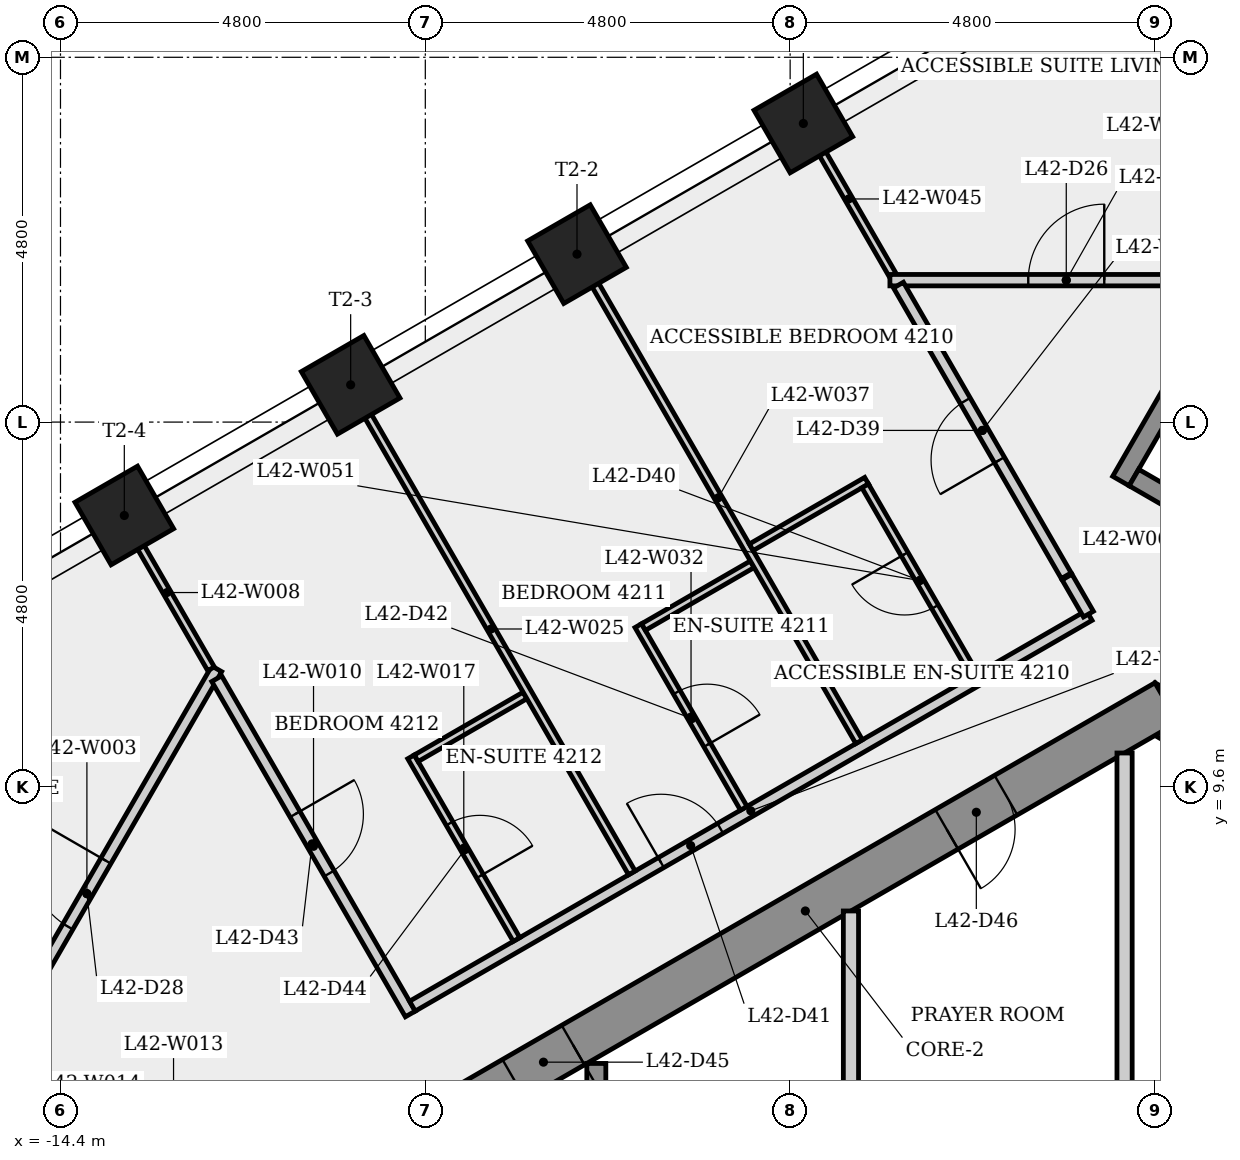
"""IFC4 building model, lengths in metres.
Left out: names, types, materials, properties, quantities, classifications, styles, units other than length and angle.
Written with IfcOpenShell. Run it as: python <this file> out.ifc"""

import sys

from ifc_helpers import new_model, si_unit, direction, frame, frame_2d, origin, origin_2d, place, context, subcontext, project, spatial, rectangle, extrude, element, fill, save


model = new_model("IFC4")
c1 = context("Model", 3, precision=1e-05, world=origin(), true_north=direction((0.0, 1.0)))
c2 = subcontext(c1, "Body", "Model", "MODEL_VIEW")
j1 = project(units=[si_unit("LENGTHUNIT", "METRE"), si_unit("PLANEANGLEUNIT", "RADIAN")], contexts=[c1])
p1 = place(None, origin())
s1 = spatial("IfcSite", under=j1, at=p1, CompositionType="ELEMENT")
p2 = place(p1, origin())
s2 = spatial("IfcBuilding", under=s1, at=p2, CompositionType="ELEMENT")
p3 = place(p2, frame((0.0, 0.0, 159.5)))
s3 = spatial("IfcBuildingStorey", under=s2, at=p3, CompositionType="ELEMENT", Elevation=159.5)
p4 = place(p3, frame((9.35, 5.225, 0.0), z_axis=(0.0, 0.0, 1.0), x_axis=(-0.866023993627, 0.500002442456, 0.0)))
e1 = element("IfcWall", 1, at=p4, inside=s3, PredefinedType="SHEAR", context=c2, shape_type="SweptSolid", body=[
    extrude(rectangle(XDim=10.97, YDim=0.6, at=frame_2d((5.485, 0.0))), origin(), (0.0, 0.0, 1.0), 3.4),
])
p5 = place(p4, frame((8.325, 0.0, 0.0)))
e2 = element("IfcOpeningElement", 2, at=p5, cuts=e1, PredefinedType="OPENING", context=c2, shape_type="SweptSolid", body=[
    extrude(rectangle(XDim=0.9, YDim=2.1, at=frame_2d((0.45, 1.05))), frame((0.0, 0.31, 0.0), z_axis=(0.0, -1.0, 0.0), x_axis=(1.0, 0.0, 0.0)), (0.0, 0.0, 1.0), 0.62),
])
p6 = place(p4, frame((1.518, 0.0, 0.0)))
e3 = element("IfcOpeningElement", 3, at=p6, cuts=e1, PredefinedType="OPENING", context=c2, shape_type="SweptSolid", body=[
    extrude(rectangle(XDim=0.9, YDim=2.1, at=frame_2d((0.45, 1.05))), frame((0.0, 0.31, 0.0), z_axis=(0.0, -1.0, 0.0), x_axis=(1.0, 0.0, 0.0)), (0.0, 0.0, 1.0), 0.62),
])
p7 = place(p3, frame((0.15, 10.71, 0.0), z_axis=(0.0, 0.0, 1.0), x_axis=(-0.866023993627, -0.500002442456, 0.0)))
e4 = element("IfcWall", 4, at=p7, inside=s3, PredefinedType="SHEAR", context=c2, shape_type="SweptSolid", body=[
    extrude(rectangle(XDim=10.97, YDim=0.6, at=frame_2d((5.485, 0.0))), origin(), (0.0, 0.0, 1.0), 3.4),
])
p8 = place(p7, frame((9.013, 0.0, 0.0)))
e5 = element("IfcOpeningElement", 5, at=p8, cuts=e4, PredefinedType="OPENING", context=c2, shape_type="SweptSolid", body=[
    extrude(rectangle(XDim=0.9, YDim=2.1, at=frame_2d((0.45, 1.05))), frame((0.0, 0.31, 0.0), z_axis=(0.0, -1.0, 0.0), x_axis=(1.0, 0.0, 0.0)), (0.0, 0.0, 1.0), 0.62),
])
p9 = place(p7, frame((2.437, 0.0, 0.0)))
e6 = element("IfcOpeningElement", 6, at=p9, cuts=e4, PredefinedType="OPENING", context=c2, shape_type="SweptSolid", body=[
    extrude(rectangle(XDim=0.9, YDim=2.1, at=frame_2d((0.45, 1.05))), frame((0.0, 0.31, 0.0), z_axis=(0.0, -1.0, 0.0), x_axis=(1.0, 0.0, 0.0)), (0.0, 0.0, 1.0), 0.62),
])
for number, where, z_axis, x_axis in (
    (7, (-4.626, 18.329, 0.0), (0.0, 0.0, 1.0), (-0.5, 0.866, 0.0)),
    (8, (-7.604, 16.61, 0.0), (0.0, 0.0, 1.0), (-0.5, 0.866, 0.0)),
    (9, (-10.582, 14.89, 0.0), (0.0, 0.0, 1.0), (-0.5, 0.866, 0.0)),
    (10, (-13.56, 13.171, 0.0), (0.0, 0.0, 1.0), (-0.5, 0.866, 0.0)),
):
    element("IfcColumn", number, at=place(p3, frame(where, z_axis=z_axis, x_axis=x_axis)), inside=s3, PredefinedType="COLUMN", context=c2, shape_type="SweptSolid", body=[
        extrude(rectangle(XDim=0.95, YDim=0.95, at=origin_2d()), origin(), (0.0, 0.0, 1.0), 3.4),
    ])
p10 = place(p3, frame((-15.76, 5.237, 0.0), z_axis=(0.0, 0.0, 1.0), x_axis=(0.500009081712, 0.866020160392, 0.0)))
e11 = element("IfcWall", 11, at=p10, inside=s3, PredefinedType="PARTITIONING", context=c2, shape_type="SweptSolid", body=[
    extrude(rectangle(XDim=6.832, YDim=0.15, at=frame_2d((3.416, 0.0))), origin(), (0.0, 0.0, 1.0), 3.05),
])
p11 = place(p10, frame((2.916, 0.0, 0.0)))
e12 = element("IfcOpeningElement", 12, at=p11, cuts=e11, PredefinedType="OPENING", context=c2, shape_type="SweptSolid", body=[
    extrude(rectangle(XDim=1.0, YDim=2.1, at=frame_2d((0.5, 1.05))), frame((0.0, 0.085, 0.0), z_axis=(0.0, -1.0, 0.0), x_axis=(1.0, 0.0, 0.0)), (0.0, 0.0, 1.0), 0.17),
])
p12 = place(p3, frame((-13.578, 13.161, 0.0), z_axis=(0.0, 0.0, 1.0), x_axis=(0.500014285048, -0.866017156151, 0.0)))
e13 = element("IfcWall", 13, at=p12, inside=s3, PredefinedType="PARTITIONING", context=c2, shape_type="SweptSolid", body=[
    extrude(rectangle(XDim=2.317, YDim=0.1, at=frame_2d((1.159, 0.0))), origin(), (0.0, 0.0, 1.0), 3.05),
])
p13 = place(p3, frame((-12.344, 11.024, 0.0), z_axis=(0.0, 0.0, 1.0), x_axis=(0.50001008724, -0.866019579835, 0.0)))
e14 = element("IfcWall", 14, at=p13, inside=s3, PredefinedType="PARTITIONING", context=c2, shape_type="SweptSolid", body=[
    extrude(rectangle(XDim=5.094, YDim=0.15, at=frame_2d((2.547, 0.0))), origin(), (0.0, 0.0, 1.0), 3.05),
])
p14 = place(p13, frame((2.06, 0.0, 0.0)))
e15 = element("IfcOpeningElement", 15, at=p14, cuts=e14, PredefinedType="OPENING", context=c2, shape_type="SweptSolid", body=[
    extrude(rectangle(XDim=0.9, YDim=2.1, at=frame_2d((0.45, 1.05))), frame((0.0, 0.085, 0.0), z_axis=(0.0, -1.0, 0.0), x_axis=(1.0, 0.0, 0.0)), (0.0, 0.0, 1.0), 0.17),
])
p15 = place(p3, frame((-9.77, 6.715, 0.0), z_axis=(0.0, 0.0, 1.0), x_axis=(0.866022281964, 0.500005407112, 0.0)))
e16 = element("IfcWall", 16, at=p15, inside=s3, PredefinedType="PARTITIONING", context=c2, shape_type="SweptSolid", body=[
    extrude(rectangle(XDim=10.282, YDim=0.15, at=frame_2d((5.141, 0.0))), origin(), (0.0, 0.0, 1.0), 3.05),
])
p16 = place(p15, frame((3.777, 0.0, 0.0)))
e17 = element("IfcOpeningElement", 17, at=p16, cuts=e16, PredefinedType="OPENING", context=c2, shape_type="SweptSolid", body=[
    extrude(rectangle(XDim=0.9, YDim=2.1, at=frame_2d((0.45, 1.05))), frame((0.0, 0.085, 0.0), z_axis=(0.0, -1.0, 0.0), x_axis=(1.0, 0.0, 0.0)), (0.0, 0.0, 1.0), 0.17),
])
p17 = place(p3, frame((-9.788, 9.995, 0.0), z_axis=(0.0, 0.0, 1.0), x_axis=(0.50007530636, -0.865981921271, 0.0)))
e18 = element("IfcWall", 18, at=p17, inside=s3, PredefinedType="PARTITIONING", context=c2, shape_type="SweptSolid", body=[
    extrude(rectangle(XDim=2.775, YDim=0.1, at=frame_2d((1.387, 0.0))), origin(), (0.0, 0.0, 1.0), 3.05),
])
p18 = place(p17, frame((1.012, 0.0, 0.0)))
e19 = element("IfcOpeningElement", 19, at=p18, cuts=e18, PredefinedType="OPENING", context=c2, shape_type="SweptSolid", body=[
    extrude(rectangle(XDim=0.8, YDim=2.1, at=frame_2d((0.4, 1.05))), frame((0.0, 0.06, 0.0), z_axis=(0.0, -1.0, 0.0), x_axis=(1.0, 0.0, 0.0)), (0.0, 0.0, 1.0), 0.12),
])
p19 = place(p3, frame((-8.288, 10.803, 0.0), z_axis=(0.0, 0.0, 1.0), x_axis=(-0.866052736899, -0.499952654668, 0.0)))
e20 = element("IfcWall", 20, at=p19, inside=s3, PredefinedType="PARTITIONING", context=c2, shape_type="SweptSolid", body=[
    extrude(rectangle(XDim=1.653, YDim=0.1, at=frame_2d((0.826, 0.0))), origin(), (0.0, 0.0, 1.0), 3.05),
])
p20 = place(p3, frame((-10.588, 14.887, 0.0), z_axis=(0.0, 0.0, 1.0), x_axis=(0.499997136009, -0.866027057304, 0.0)))
e21 = element("IfcWall", 21, at=p20, inside=s3, PredefinedType="PARTITIONING", context=c2, shape_type="SweptSolid", body=[
    extrude(rectangle(XDim=7.412, YDim=0.1, at=frame_2d((3.706, 0.0))), origin(), (0.0, 0.0, 1.0), 3.05),
])
p21 = place(p3, frame((-7.35, 1.925, 0.0), z_axis=(0.0, 0.0, 1.0), x_axis=(0.0, 1.0, 0.0)))
e22 = element("IfcWall", 22, at=p21, inside=s3, PredefinedType="SHEAR", context=c2, shape_type="SweptSolid", body=[
    extrude(rectangle(XDim=4.036, YDim=0.25, at=frame_2d((2.018, 0.0))), origin(), (0.0, 0.0, 1.0), 3.05),
])
p22 = place(p3, frame((-6.798, 11.722, 0.0), z_axis=(0.0, 0.0, 1.0), x_axis=(0.499971228071, -0.866042014628, 0.0)))
e23 = element("IfcWall", 23, at=p22, inside=s3, PredefinedType="PARTITIONING", context=c2, shape_type="SweptSolid", body=[
    extrude(rectangle(XDim=2.775, YDim=0.1, at=frame_2d((1.388, 0.0))), origin(), (0.0, 0.0, 1.0), 3.05),
])
p23 = place(p22, frame((1.012, 0.0, 0.0)))
e24 = element("IfcOpeningElement", 24, at=p23, cuts=e23, PredefinedType="OPENING", context=c2, shape_type="SweptSolid", body=[
    extrude(rectangle(XDim=0.8, YDim=2.1, at=frame_2d((0.4, 1.05))), frame((0.0, 0.06, 0.0), z_axis=(0.0, -1.0, 0.0), x_axis=(1.0, 0.0, 0.0)), (0.0, 0.0, 1.0), 0.12),
])
p24 = place(p3, frame((-5.298, 12.529, 0.0), z_axis=(0.0, 0.0, 1.0), x_axis=(-0.866116703855, -0.499841830287, 0.0)))
e25 = element("IfcWall", 25, at=p24, inside=s3, PredefinedType="PARTITIONING", context=c2, shape_type="SweptSolid", body=[
    extrude(rectangle(XDim=1.652, YDim=0.1, at=frame_2d((0.826, 0.0))), origin(), (0.0, 0.0, 1.0), 3.05),
])
p25 = place(p3, frame((-7.598, 16.613, 0.0), z_axis=(0.0, 0.0, 1.0), x_axis=(0.500011399757, -0.866018822032, 0.0)))
e26 = element("IfcWall", 26, at=p25, inside=s3, PredefinedType="PARTITIONING", context=c2, shape_type="SweptSolid", body=[
    extrude(rectangle(XDim=7.411, YDim=0.1, at=frame_2d((3.706, 0.0))), origin(), (0.0, 0.0, 1.0), 3.05),
])
p26 = place(p3, frame((-4.0, 7.967, 0.0), z_axis=(0.0, 0.0, 1.0), x_axis=(0.0, -1.0, 0.0)))
e27 = element("IfcWall", 27, at=p26, inside=s3, PredefinedType="PARTITIONING", context=c2, shape_type="SweptSolid", body=[
    extrude(rectangle(XDim=2.692, YDim=0.2, at=frame_2d((1.346, 0.0))), origin(), (0.0, 0.0, 1.0), 3.05),
])
p27 = place(p3, frame((-3.794, 13.629, 0.0), z_axis=(0.0, 0.0, 1.0), x_axis=(-0.866013897511, -0.50001992892, 0.0)))
e28 = element("IfcWall", 28, at=p27, inside=s3, PredefinedType="PARTITIONING", context=c2, shape_type="SweptSolid", body=[
    extrude(rectangle(XDim=1.752, YDim=0.1, at=frame_2d((0.876, 0.0))), origin(), (0.0, 0.0, 1.0), 3.05),
])
p28 = place(p3, frame((-3.45, 16.332, 0.0), z_axis=(0.0, 0.0, 1.0), x_axis=(-0.499968667644, 0.866043492773, 0.0)))
e29 = element("IfcWall", 29, at=p28, inside=s3, PredefinedType="PARTITIONING", context=c2, shape_type="SweptSolid", body=[
    extrude(rectangle(XDim=2.318, YDim=0.1, at=frame_2d((1.159, 0.0))), origin(), (0.0, 0.0, 1.0), 3.05),
])
p29 = place(p3, frame((-3.487, 16.267, 0.0), z_axis=(0.0, 0.0, 1.0), x_axis=(1.0, 0.0, 0.0)))
e30 = element("IfcWall", 30, at=p29, inside=s3, PredefinedType="PARTITIONING", context=c2, shape_type="SweptSolid", body=[
    extrude(rectangle(XDim=4.64, YDim=0.15, at=frame_2d((2.32, 0.0))), origin(), (0.0, 0.0, 1.0), 3.05),
])
p30 = place(p29, frame((1.82, 0.0, 0.0)))
e31 = element("IfcOpeningElement", 31, at=p30, cuts=e30, PredefinedType="OPENING", context=c2, shape_type="SweptSolid", body=[
    extrude(rectangle(XDim=1.0, YDim=2.1, at=frame_2d((0.5, 1.05))), frame((0.0, 0.085, 0.0), z_axis=(0.0, -1.0, 0.0), x_axis=(1.0, 0.0, 0.0)), (0.0, 0.0, 1.0), 0.17),
])
p31 = place(p3, frame((-2.375, 11.071, 0.0), z_axis=(0.0, 0.0, 1.0), x_axis=(-0.500011588718, 0.866018712932, 0.0)))
e32 = element("IfcWall", 32, at=p31, inside=s3, PredefinedType="PARTITIONING", context=c2, shape_type="SweptSolid", body=[
    extrude(rectangle(XDim=2.875, YDim=0.1, at=frame_2d((1.438, 0.0))), origin(), (0.0, 0.0, 1.0), 3.05),
])
p32 = place(p31, frame((1.038, 0.0, 0.0)))
e33 = element("IfcOpeningElement", 33, at=p32, cuts=e32, PredefinedType="OPENING", context=c2, shape_type="SweptSolid", body=[
    extrude(rectangle(XDim=0.8, YDim=2.1, at=frame_2d((0.4, 1.05))), frame((0.0, 0.06, 0.0), z_axis=(0.0, -1.0, 0.0), x_axis=(1.0, 0.0, 0.0)), (0.0, 0.0, 1.0), 0.12),
])
p33 = place(p3, frame((-1.167, 12.378, 0.0), z_axis=(0.0, 0.0, 1.0), x_axis=(-0.499998454624, 0.866026296006, 0.0)))
e34 = element("IfcWall", 34, at=p33, inside=s3, PredefinedType="PARTITIONING", context=c2, shape_type="SweptSolid", body=[
    extrude(rectangle(XDim=4.416, YDim=0.15, at=frame_2d((2.208, 0.0))), origin(), (0.0, 0.0, 1.0), 3.05),
])
p34 = place(p33, frame((1.758, 0.0, 0.0)))
e35 = element("IfcOpeningElement", 35, at=p34, cuts=e34, PredefinedType="OPENING", context=c2, shape_type="SweptSolid", body=[
    extrude(rectangle(XDim=0.9, YDim=2.1, at=frame_2d((0.45, 1.05))), frame((0.0, 0.085, 0.0), z_axis=(0.0, -1.0, 0.0), x_axis=(1.0, 0.0, 0.0)), (0.0, 0.0, 1.0), 0.17),
])
p35 = place(p3, frame((-1.157, 12.361, 0.0), z_axis=(0.0, 0.0, 1.0), x_axis=(0.499959971872, -0.866048512801, 0.0)))
e36 = element("IfcWall", 36, at=p35, inside=s3, PredefinedType="PARTITIONING", context=c2, shape_type="SweptSolid", body=[
    extrude(rectangle(XDim=0.563, YDim=0.15, at=frame_2d((0.282, 0.0))), origin(), (0.0, 0.0, 1.0), 3.05),
])
p36 = place(p3, frame((-0.4, 10.046, 0.0), z_axis=(0.0, 0.0, 1.0), x_axis=(0.0, -1.0, 0.0)))
e37 = element("IfcWall", 37, at=p36, inside=s3, PredefinedType="PARTITIONING", context=c2, shape_type="SweptSolid", body=[
    extrude(rectangle(XDim=4.771, YDim=0.2, at=frame_2d((2.385, 0.0))), origin(), (0.0, 0.0, 1.0), 3.05),
])
p37 = place(p3, frame((-0.448, 13.624, 0.0), z_axis=(0.0, 0.0, 1.0), x_axis=(0.500037662692, 0.866003658127, 0.0)))
e38 = element("IfcWall", 38, at=p37, inside=s3, PredefinedType="SHEAR", context=c2, shape_type="SweptSolid", body=[
    extrude(rectangle(XDim=2.95, YDim=0.25, at=frame_2d((1.475, 0.0))), origin(), (0.0, 0.0, 1.0), 3.05),
])
p38 = place(p3, frame((2.581, 12.02, 0.0), z_axis=(0.0, 0.0, 1.0), x_axis=(-0.866040211805, 0.499974350878, 0.0)))
e39 = element("IfcWall", 39, at=p38, inside=s3, PredefinedType="SHEAR", context=c2, shape_type="SweptSolid", body=[
    extrude(rectangle(XDim=3.3, YDim=0.25, at=frame_2d((1.65, 0.0))), origin(), (0.0, 0.0, 1.0), 3.05),
])
p39 = place(p30, origin())
e40 = element("IfcDoor", 40, at=p39, inside=s3, OperationType="SINGLE_SWING_RIGHT", PredefinedType="DOOR", context=c2, shape_type="SweptSolid", body=[
    extrude(rectangle(XDim=1.0, YDim=2.1, at=frame_2d((0.5, 1.05))), frame((0.0, 0.025, 0.0), z_axis=(0.0, -1.0, 0.0), x_axis=(1.0, 0.0, 0.0)), (0.0, 0.0, 1.0), 0.05),
])
fill(e31, e40)
p40 = place(p11, origin())
e41 = element("IfcDoor", 41, at=p40, inside=s3, OperationType="SINGLE_SWING_RIGHT", PredefinedType="DOOR", context=c2, shape_type="SweptSolid", body=[
    extrude(rectangle(XDim=1.0, YDim=2.1, at=frame_2d((0.5, 1.05))), frame((0.0, 0.025, 0.0), z_axis=(0.0, -1.0, 0.0), x_axis=(1.0, 0.0, 0.0)), (0.0, 0.0, 1.0), 0.05),
])
fill(e12, e41)
p41 = place(p34, origin())
e42 = element("IfcDoor", 42, at=p41, inside=s3, OperationType="SINGLE_SWING_LEFT", PredefinedType="DOOR", context=c2, shape_type="SweptSolid", body=[
    extrude(rectangle(XDim=0.9, YDim=2.1, at=frame_2d((0.45, 1.05))), frame((0.0, 0.025, 0.0), z_axis=(0.0, -1.0, 0.0), x_axis=(1.0, 0.0, 0.0)), (0.0, 0.0, 1.0), 0.05),
])
fill(e35, e42)
p42 = place(p32, origin())
e43 = element("IfcDoor", 43, at=p42, inside=s3, OperationType="SINGLE_SWING_RIGHT", PredefinedType="DOOR", context=c2, shape_type="SweptSolid", body=[
    extrude(rectangle(XDim=0.8, YDim=2.1, at=frame_2d((0.4, 1.05))), frame((0.0, 0.025, 0.0), z_axis=(0.0, -1.0, 0.0), x_axis=(1.0, 0.0, 0.0)), (0.0, 0.0, 1.0), 0.05),
])
fill(e33, e43)
p43 = place(p16, origin())
e44 = element("IfcDoor", 44, at=p43, inside=s3, OperationType="SINGLE_SWING_LEFT", PredefinedType="DOOR", context=c2, shape_type="SweptSolid", body=[
    extrude(rectangle(XDim=0.9, YDim=2.1, at=frame_2d((0.45, 1.05))), frame((0.0, 0.025, 0.0), z_axis=(0.0, -1.0, 0.0), x_axis=(1.0, 0.0, 0.0)), (0.0, 0.0, 1.0), 0.05),
])
fill(e17, e44)
p44 = place(p23, origin())
e45 = element("IfcDoor", 45, at=p44, inside=s3, OperationType="SINGLE_SWING_RIGHT", PredefinedType="DOOR", context=c2, shape_type="SweptSolid", body=[
    extrude(rectangle(XDim=0.8, YDim=2.1, at=frame_2d((0.4, 1.05))), frame((0.0, 0.025, 0.0), z_axis=(0.0, -1.0, 0.0), x_axis=(1.0, 0.0, 0.0)), (0.0, 0.0, 1.0), 0.05),
])
fill(e24, e45)
p45 = place(p14, origin())
e46 = element("IfcDoor", 46, at=p45, inside=s3, OperationType="SINGLE_SWING_LEFT", PredefinedType="DOOR", context=c2, shape_type="SweptSolid", body=[
    extrude(rectangle(XDim=0.9, YDim=2.1, at=frame_2d((0.45, 1.05))), frame((0.0, 0.025, 0.0), z_axis=(0.0, -1.0, 0.0), x_axis=(1.0, 0.0, 0.0)), (0.0, 0.0, 1.0), 0.05),
])
fill(e15, e46)
p46 = place(p18, origin())
e47 = element("IfcDoor", 47, at=p46, inside=s3, OperationType="SINGLE_SWING_RIGHT", PredefinedType="DOOR", context=c2, shape_type="SweptSolid", body=[
    extrude(rectangle(XDim=0.8, YDim=2.1, at=frame_2d((0.4, 1.05))), frame((0.0, 0.025, 0.0), z_axis=(0.0, -1.0, 0.0), x_axis=(1.0, 0.0, 0.0)), (0.0, 0.0, 1.0), 0.05),
])
fill(e19, e47)
p47 = place(p8, origin())
e48 = element("IfcDoor", 48, at=p47, inside=s3, OperationType="SINGLE_SWING_LEFT", PredefinedType="DOOR", context=c2, shape_type="SweptSolid", body=[
    extrude(rectangle(XDim=0.9, YDim=2.1, at=frame_2d((0.45, 1.05))), frame((0.0, 0.025, 0.0), z_axis=(0.0, -1.0, 0.0), x_axis=(1.0, 0.0, 0.0)), (0.0, 0.0, 1.0), 0.05),
])
fill(e5, e48)
p48 = place(p9, origin())
e49 = element("IfcDoor", 49, at=p48, inside=s3, OperationType="SINGLE_SWING_RIGHT", PredefinedType="DOOR", context=c2, shape_type="SweptSolid", body=[
    extrude(rectangle(XDim=0.9, YDim=2.1, at=frame_2d((0.45, 1.05))), frame((0.0, 0.025, 0.0), z_axis=(0.0, -1.0, 0.0), x_axis=(1.0, 0.0, 0.0)), (0.0, 0.0, 1.0), 0.05),
])
fill(e6, e49)
save(model, sys.argv[1])
